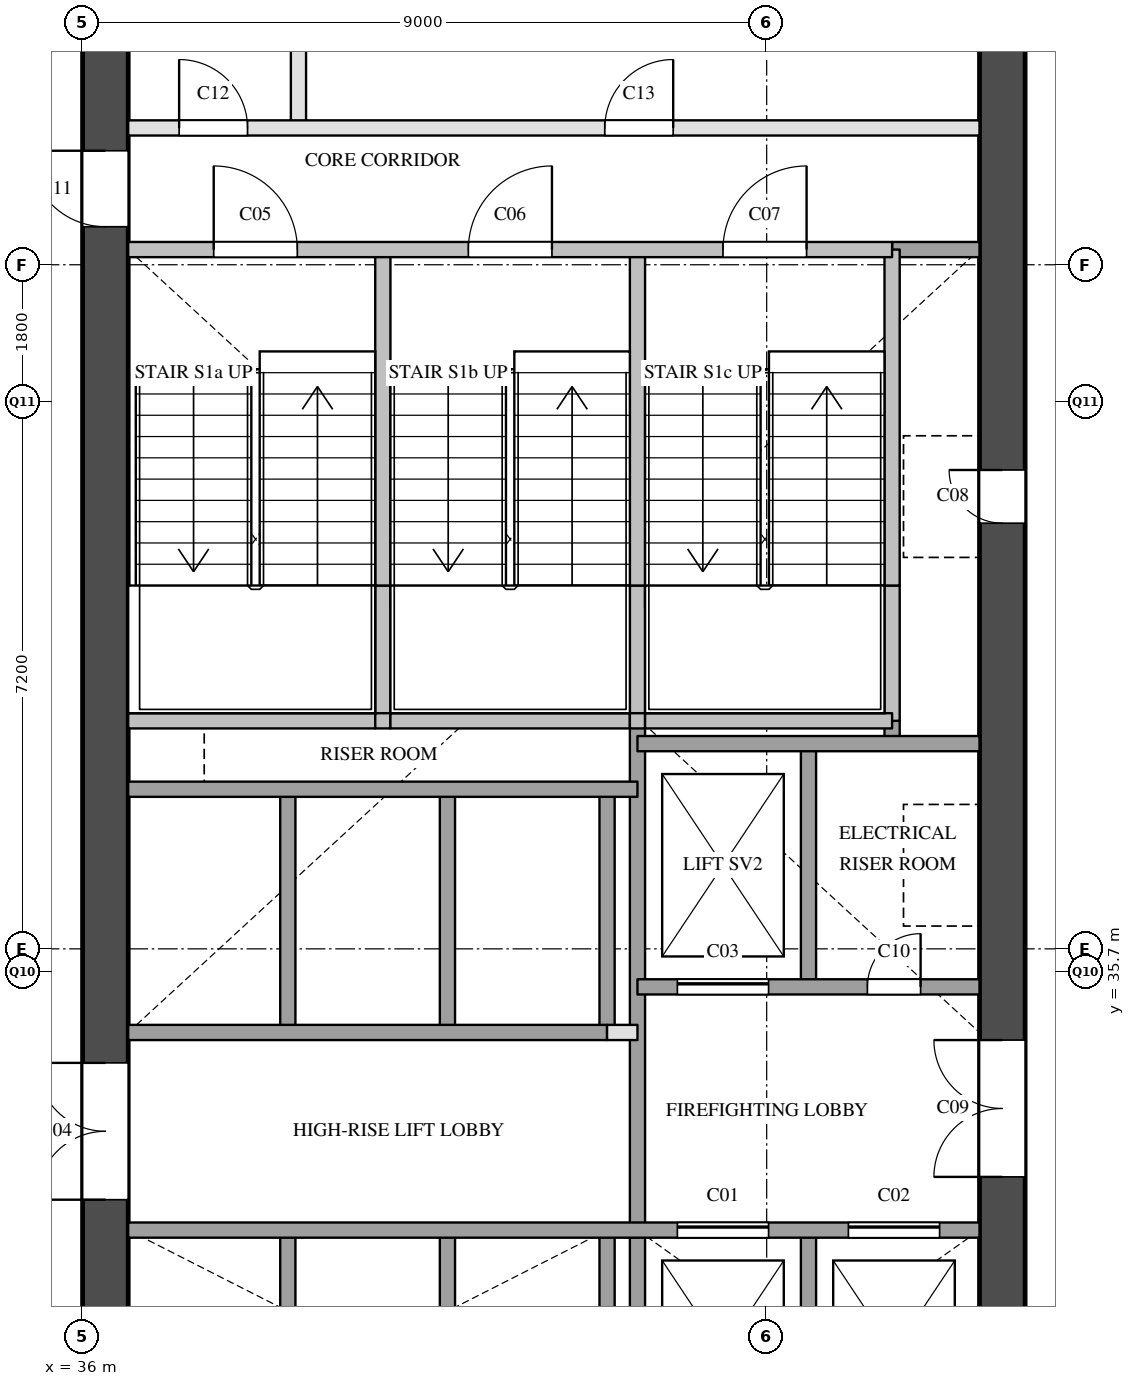
"""IFC4 building model, lengths in metres.
Left out: names, types, materials, properties, quantities, classifications, styles, units other than length and angle.
Written with IfcOpenShell. Run it as: python <this file> out.ifc"""

import sys

from ifc_helpers import new_model, si_unit, direction, frame, frame_2d, origin, place, context, subcontext, project, spatial, rectangle, extrude, element, fill, save


model = new_model("IFC4")
c1 = context("Model", 3, precision=1e-05, world=origin(), true_north=direction((0.0, 1.0)))
c2 = subcontext(c1, "Body", "Model", "MODEL_VIEW")
j1 = project(units=[si_unit("LENGTHUNIT", "METRE"), si_unit("PLANEANGLEUNIT", "RADIAN")], contexts=[c1])
p1 = place(None, origin())
s1 = spatial("IfcSite", under=j1, at=p1, CompositionType="ELEMENT")
p2 = place(p1, origin())
s2 = spatial("IfcBuilding", under=s1, at=p2, CompositionType="ELEMENT")
p3 = place(p2, frame((0.0, 0.0, 53.8)))
s3 = spatial("IfcBuildingStorey", under=s2, at=p3, CompositionType="ELEMENT", Elevation=53.8)
p4 = place(p3, frame((36.3, 29.1, 0.0), z_axis=(0.0, 0.0, 1.0), x_axis=(0.0, 1.0, 0.0)))
e1 = element("IfcWall", 1, at=p4, inside=s3, PredefinedType="SHEAR", context=c2, shape_type="SweptSolid", body=[
    extrude(rectangle(XDim=20.3, YDim=0.6, at=frame_2d((10.15, 0.0))), origin(), (0.0, 0.0, 1.0), 3.5),
])
p5 = place(p4, frame((3.6, 0.0, 0.0)))
e2 = element("IfcOpeningElement", 2, at=p5, cuts=e1, PredefinedType="OPENING", context=c2, shape_type="SweptSolid", body=[
    extrude(rectangle(XDim=1.8, YDim=2.1, at=frame_2d((0.9, 1.05))), frame((0.0, 0.31, 0.0), z_axis=(0.0, -1.0, 0.0), x_axis=(1.0, 0.0, 0.0)), (0.0, 0.0, 1.0), 0.62),
])
p6 = place(p4, frame((16.4, 0.0, 0.0)))
e3 = element("IfcOpeningElement", 3, at=p6, cuts=e1, PredefinedType="OPENING", context=c2, shape_type="SweptSolid", body=[
    extrude(rectangle(XDim=1.0, YDim=2.1, at=frame_2d((0.5, 1.05))), frame((0.0, 0.31, 0.0), z_axis=(0.0, -1.0, 0.0), x_axis=(1.0, 0.0, 0.0)), (0.0, 0.0, 1.0), 0.62),
])
p7 = place(p3, frame((48.1, 29.1, 0.0), z_axis=(0.0, 0.0, 1.0), x_axis=(0.0, 1.0, 0.0)))
e4 = element("IfcWall", 4, at=p7, inside=s3, PredefinedType="SHEAR", context=c2, shape_type="SweptSolid", body=[
    extrude(rectangle(XDim=20.3, YDim=0.6, at=frame_2d((10.15, 0.0))), origin(), (0.0, 0.0, 1.0), 3.5),
])
p8 = place(p7, frame((12.5, 0.0, 0.0)))
e5 = element("IfcOpeningElement", 5, at=p8, cuts=e4, PredefinedType="OPENING", context=c2, shape_type="SweptSolid", body=[
    extrude(rectangle(XDim=0.7, YDim=2.1, at=frame_2d((0.35, 1.05))), frame((0.0, 0.31, 0.0), z_axis=(0.0, -1.0, 0.0), x_axis=(1.0, 0.0, 0.0)), (0.0, 0.0, 1.0), 0.62),
])
p9 = place(p7, frame((3.9, 0.0, 0.0)))
e6 = element("IfcOpeningElement", 6, at=p9, cuts=e4, PredefinedType="OPENING", context=c2, shape_type="SweptSolid", body=[
    extrude(rectangle(XDim=1.8, YDim=2.1, at=frame_2d((0.9, 1.05))), frame((0.0, 0.31, 0.0), z_axis=(0.0, -1.0, 0.0), x_axis=(1.0, 0.0, 0.0)), (0.0, 0.0, 1.0), 0.62),
])
p10 = place(p3, frame((38.7, 29.1, 0.0), z_axis=(0.0, 0.0, 1.0), x_axis=(0.0, 1.0, 0.0)))
e7 = element("IfcWall", 7, at=p10, inside=s3, PredefinedType="SOLIDWALL", context=c2, shape_type="SweptSolid", body=[
    extrude(rectangle(XDim=3.2, YDim=0.2, at=frame_2d((1.6, 0.0))), origin(), (0.0, 0.0, 1.0), 3.5),
])
p11 = place(p3, frame((38.7, 34.9, 0.0), z_axis=(0.0, 0.0, 1.0), x_axis=(0.0, 1.0, 0.0)))
e8 = element("IfcWall", 8, at=p11, inside=s3, PredefinedType="SOLIDWALL", context=c2, shape_type="SweptSolid", body=[
    extrude(rectangle(XDim=3.2, YDim=0.2, at=frame_2d((1.6, 0.0))), origin(), (0.0, 0.0, 1.0), 3.5),
])
p12 = place(p3, frame((38.84, 46.8, 0.0), z_axis=(0.0, 0.0, 1.0), x_axis=(0.0, 1.0, 0.0)))
e9 = element("IfcWall", 9, at=p12, inside=s3, PredefinedType="PARTITIONING", context=c2, shape_type="SweptSolid", body=[
    extrude(rectangle(XDim=2.2, YDim=0.2, at=frame_2d((1.1, 0.0))), origin(), (0.0, 0.0, 1.0), 3.5),
])
p13 = place(p3, frame((39.95, 39.0, 0.0), z_axis=(0.0, 0.0, 1.0), x_axis=(0.0, 1.0, 0.0)))
e10 = element("IfcWall", 10, at=p13, inside=s3, PredefinedType="SOLIDWALL", context=c2, shape_type="SweptSolid", body=[
    extrude(rectangle(XDim=1.78, YDim=0.2, at=frame_2d((0.89, 0.0))), origin(), (0.0, 0.0, 1.0), 3.5),
])
p14 = place(p3, frame((39.95, 40.78, 0.0), z_axis=(0.0, 0.0, 1.0), x_axis=(0.0, 1.0, 0.0)))
e11 = element("IfcWall", 11, at=p14, inside=s3, PredefinedType="SOLIDWALL", context=c2, shape_type="SweptSolid", body=[
    extrude(rectangle(XDim=4.42, YDim=0.2, at=frame_2d((2.21, 0.0))), origin(), (0.0, 0.0, 1.0), 3.5),
])
p15 = place(p3, frame((40.8, 29.1, 0.0), z_axis=(0.0, 0.0, 1.0), x_axis=(0.0, 1.0, 0.0)))
e12 = element("IfcWall", 12, at=p15, inside=s3, PredefinedType="SOLIDWALL", context=c2, shape_type="SweptSolid", body=[
    extrude(rectangle(XDim=3.2, YDim=0.2, at=frame_2d((1.6, 0.0))), origin(), (0.0, 0.0, 1.0), 3.5),
])
p16 = place(p3, frame((40.8, 34.9, 0.0), z_axis=(0.0, 0.0, 1.0), x_axis=(0.0, 1.0, 0.0)))
e13 = element("IfcWall", 13, at=p16, inside=s3, PredefinedType="SOLIDWALL", context=c2, shape_type="SweptSolid", body=[
    extrude(rectangle(XDim=3.2, YDim=0.2, at=frame_2d((1.6, 0.0))), origin(), (0.0, 0.0, 1.0), 3.5),
])
p17 = place(p3, frame((42.9, 29.1, 0.0), z_axis=(0.0, 0.0, 1.0), x_axis=(0.0, 1.0, 0.0)))
e14 = element("IfcWall", 14, at=p17, inside=s3, PredefinedType="SOLIDWALL", context=c2, shape_type="SweptSolid", body=[
    extrude(rectangle(XDim=3.2, YDim=0.2, at=frame_2d((1.6, 0.0))), origin(), (0.0, 0.0, 1.0), 3.5),
])
p18 = place(p3, frame((42.9, 34.9, 0.0), z_axis=(0.0, 0.0, 1.0), x_axis=(0.0, 1.0, 0.0)))
e15 = element("IfcWall", 15, at=p18, inside=s3, PredefinedType="SOLIDWALL", context=c2, shape_type="SweptSolid", body=[
    extrude(rectangle(XDim=3.2, YDim=0.2, at=frame_2d((1.6, 0.0))), origin(), (0.0, 0.0, 1.0), 3.5),
])
p19 = place(p3, frame((43.3, 29.1, 0.0), z_axis=(0.0, 0.0, 1.0), x_axis=(0.0, 1.0, 0.0)))
e16 = element("IfcWall", 16, at=p19, inside=s3, PredefinedType="SOLIDWALL", context=c2, shape_type="SweptSolid", body=[
    extrude(rectangle(XDim=9.9, YDim=0.2, at=frame_2d((4.95, 0.0))), origin(), (0.0, 0.0, 1.0), 3.5),
])
p20 = place(p3, frame((43.3, 39.0, 0.0), z_axis=(0.0, 0.0, 1.0), x_axis=(0.0, 1.0, 0.0)))
e17 = element("IfcWall", 17, at=p20, inside=s3, PredefinedType="SOLIDWALL", context=c2, shape_type="SweptSolid", body=[
    extrude(rectangle(XDim=1.78, YDim=0.2, at=frame_2d((0.89, 0.0))), origin(), (0.0, 0.0, 1.0), 3.5),
])
p21 = place(p3, frame((43.3, 40.78, 0.0), z_axis=(0.0, 0.0, 1.0), x_axis=(0.0, 1.0, 0.0)))
e18 = element("IfcWall", 18, at=p21, inside=s3, PredefinedType="SOLIDWALL", context=c2, shape_type="SweptSolid", body=[
    extrude(rectangle(XDim=4.42, YDim=0.2, at=frame_2d((2.21, 0.0))), origin(), (0.0, 0.0, 1.0), 3.5),
])
for number, where, z_axis, x_axis in (
    (19, (45.55, 29.1, 0.0), (0.0, 0.0, 1.0), (0.0, 1.0, 0.0)),
    (20, (45.55, 35.5, 0.0), (0.0, 0.0, 1.0), (0.0, 1.0, 0.0)),
):
    element("IfcWall", number, at=place(p3, frame(where, z_axis=z_axis, x_axis=x_axis)), inside=s3, PredefinedType="SOLIDWALL", context=c2, shape_type="SweptSolid", body=[
        extrude(rectangle(XDim=3.2, YDim=0.2, at=frame_2d((1.6, 0.0))), origin(), (0.0, 0.0, 1.0), 3.5),
    ])
p22 = place(p3, frame((46.65, 38.7, 0.0), z_axis=(0.0, 0.0, 1.0), x_axis=(0.0, 1.0, 0.0)))
e21 = element("IfcWall", 21, at=p22, inside=s3, PredefinedType="SOLIDWALL", context=c2, shape_type="SweptSolid", body=[
    extrude(rectangle(XDim=0.3, YDim=0.2, at=frame_2d((0.15, 0.0))), origin(), (0.0, 0.0, 1.0), 3.5),
])
p23 = place(p3, frame((46.65, 39.0, 0.0), z_axis=(0.0, 0.0, 1.0), x_axis=(0.0, 1.0, 0.0)))
e22 = element("IfcWall", 22, at=p23, inside=s3, PredefinedType="SOLIDWALL", context=c2, shape_type="SweptSolid", body=[
    extrude(rectangle(XDim=1.78, YDim=0.2, at=frame_2d((0.89, 0.0))), origin(), (0.0, 0.0, 1.0), 3.5),
])
p24 = place(p3, frame((46.65, 40.78, 0.0), z_axis=(0.0, 0.0, 1.0), x_axis=(0.0, 1.0, 0.0)))
e23 = element("IfcWall", 23, at=p24, inside=s3, PredefinedType="SOLIDWALL", context=c2, shape_type="SweptSolid", body=[
    extrude(rectangle(XDim=4.42, YDim=0.2, at=frame_2d((2.21, 0.0))), origin(), (0.0, 0.0, 1.0), 3.5),
])
p25 = place(p3, frame((36.6, 32.3, 0.0), z_axis=(0.0, 0.0, 1.0), x_axis=(1.0, 0.0, 0.0)))
e24 = element("IfcWall", 24, at=p25, inside=s3, PredefinedType="SOLIDWALL", context=c2, shape_type="SweptSolid", body=[
    extrude(rectangle(XDim=11.2, YDim=0.2, at=frame_2d((5.6, 0.0))), origin(), (0.0, 0.0, 1.0), 3.5),
])
p26 = place(p25, frame((7.225, 0.0, 0.0)))
e25 = element("IfcOpeningElement", 25, at=p26, cuts=e24, PredefinedType="OPENING", context=c2, shape_type="SweptSolid", body=[
    extrude(rectangle(XDim=1.2, YDim=2.1, at=frame_2d((0.6, 1.05))), frame((0.0, 0.11, 0.0), z_axis=(0.0, -1.0, 0.0), x_axis=(1.0, 0.0, 0.0)), (0.0, 0.0, 1.0), 0.22),
])
p27 = place(p25, frame((9.475, 0.0, 0.0)))
e26 = element("IfcOpeningElement", 26, at=p27, cuts=e24, PredefinedType="OPENING", context=c2, shape_type="SweptSolid", body=[
    extrude(rectangle(XDim=1.2, YDim=2.1, at=frame_2d((0.6, 1.05))), frame((0.0, 0.11, 0.0), z_axis=(0.0, -1.0, 0.0), x_axis=(1.0, 0.0, 0.0)), (0.0, 0.0, 1.0), 0.22),
])
p28 = place(p3, frame((42.9, 34.9, 0.0), z_axis=(0.0, 0.0, 1.0), x_axis=(1.0, 0.0, 0.0)))
e27 = element("IfcWall", 27, at=p28, inside=s3, PredefinedType="PARTITIONING", context=c2, shape_type="SweptSolid", body=[
    extrude(rectangle(XDim=0.4, YDim=0.2, at=frame_2d((0.2, 0.0))), origin(), (0.0, 0.0, 1.0), 3.5),
])
p29 = place(p3, frame((36.6, 34.9, 0.0), z_axis=(0.0, 0.0, 1.0), x_axis=(1.0, 0.0, 0.0)))
e28 = element("IfcWall", 28, at=p29, inside=s3, PredefinedType="SOLIDWALL", context=c2, shape_type="SweptSolid", body=[
    extrude(rectangle(XDim=6.3, YDim=0.2, at=frame_2d((3.15, 0.0))), origin(), (0.0, 0.0, 1.0), 3.5),
])
p30 = place(p3, frame((43.3, 35.5, 0.0), z_axis=(0.0, 0.0, 1.0), x_axis=(1.0, 0.0, 0.0)))
e29 = element("IfcWall", 29, at=p30, inside=s3, PredefinedType="SOLIDWALL", context=c2, shape_type="SweptSolid", body=[
    extrude(rectangle(XDim=4.5, YDim=0.2, at=frame_2d((2.25, 0.0))), origin(), (0.0, 0.0, 1.0), 3.5),
])
p31 = place(p30, frame((0.525, 0.0, 0.0)))
e30 = element("IfcOpeningElement", 30, at=p31, cuts=e29, PredefinedType="OPENING", context=c2, shape_type="SweptSolid", body=[
    extrude(rectangle(XDim=1.2, YDim=2.1, at=frame_2d((0.6, 1.05))), frame((0.0, 0.11, 0.0), z_axis=(0.0, -1.0, 0.0), x_axis=(1.0, 0.0, 0.0)), (0.0, 0.0, 1.0), 0.22),
])
p32 = place(p30, frame((3.025, 0.0, 0.0)))
e31 = element("IfcOpeningElement", 31, at=p32, cuts=e29, PredefinedType="OPENING", context=c2, shape_type="SweptSolid", body=[
    extrude(rectangle(XDim=0.7, YDim=2.1, at=frame_2d((0.35, 1.05))), frame((0.0, 0.11, 0.0), z_axis=(0.0, -1.0, 0.0), x_axis=(1.0, 0.0, 0.0)), (0.0, 0.0, 1.0), 0.22),
])
p33 = place(p3, frame((36.6, 38.1, 0.0), z_axis=(0.0, 0.0, 1.0), x_axis=(1.0, 0.0, 0.0)))
e32 = element("IfcWall", 32, at=p33, inside=s3, PredefinedType="SOLIDWALL", context=c2, shape_type="SweptSolid", body=[
    extrude(rectangle(XDim=6.7, YDim=0.2, at=frame_2d((3.35, 0.0))), origin(), (0.0, 0.0, 1.0), 3.5),
])
p34 = place(p3, frame((43.3, 38.7, 0.0), z_axis=(0.0, 0.0, 1.0), x_axis=(1.0, 0.0, 0.0)))
e33 = element("IfcWall", 33, at=p34, inside=s3, PredefinedType="SOLIDWALL", context=c2, shape_type="SweptSolid", body=[
    extrude(rectangle(XDim=4.5, YDim=0.2, at=frame_2d((2.25, 0.0))), origin(), (0.0, 0.0, 1.0), 3.5),
])
p35 = place(p3, frame((36.6, 39.0, 0.0), z_axis=(0.0, 0.0, 1.0), x_axis=(1.0, 0.0, 0.0)))
e34 = element("IfcWall", 34, at=p35, inside=s3, PredefinedType="SOLIDWALL", context=c2, shape_type="SweptSolid", body=[
    extrude(rectangle(XDim=3.25, YDim=0.2, at=frame_2d((1.625, 0.0))), origin(), (0.0, 0.0, 1.0), 3.5),
])
p36 = place(p3, frame((39.85, 39.0, 0.0), z_axis=(0.0, 0.0, 1.0), x_axis=(1.0, 0.0, 0.0)))
e35 = element("IfcWall", 35, at=p36, inside=s3, PredefinedType="SOLIDWALL", context=c2, shape_type="SweptSolid", body=[
    extrude(rectangle(XDim=0.2, YDim=0.2, at=frame_2d((0.1, 0.0))), origin(), (0.0, 0.0, 1.0), 3.5),
])
p37 = place(p3, frame((40.05, 39.0, 0.0), z_axis=(0.0, 0.0, 1.0), x_axis=(1.0, 0.0, 0.0)))
e36 = element("IfcWall", 36, at=p37, inside=s3, PredefinedType="SOLIDWALL", context=c2, shape_type="SweptSolid", body=[
    extrude(rectangle(XDim=3.15, YDim=0.2, at=frame_2d((1.575, 0.0))), origin(), (0.0, 0.0, 1.0), 3.5),
])
p38 = place(p3, frame((43.2, 39.0, 0.0), z_axis=(0.0, 0.0, 1.0), x_axis=(1.0, 0.0, 0.0)))
e37 = element("IfcWall", 37, at=p38, inside=s3, PredefinedType="SOLIDWALL", context=c2, shape_type="SweptSolid", body=[
    extrude(rectangle(XDim=0.2, YDim=0.2, at=frame_2d((0.1, 0.0))), origin(), (0.0, 0.0, 1.0), 3.5),
])
p39 = place(p3, frame((43.4, 39.0, 0.0), z_axis=(0.0, 0.0, 1.0), x_axis=(1.0, 0.0, 0.0)))
e38 = element("IfcWall", 38, at=p39, inside=s3, PredefinedType="SOLIDWALL", context=c2, shape_type="SweptSolid", body=[
    extrude(rectangle(XDim=3.25, YDim=0.2, at=frame_2d((1.625, 0.0))), origin(), (0.0, 0.0, 1.0), 3.5),
])
p40 = place(p3, frame((46.65, 45.2, 0.0), z_axis=(0.0, 0.0, 1.0), x_axis=(1.0, 0.0, 0.0)))
e39 = element("IfcWall", 39, at=p40, inside=s3, PredefinedType="SOLIDWALL", context=c2, shape_type="SweptSolid", body=[
    extrude(rectangle(XDim=1.15, YDim=0.2, at=frame_2d((0.575, 0.0))), origin(), (0.0, 0.0, 1.0), 3.5),
])
p41 = place(p3, frame((36.6, 45.2, 0.0), z_axis=(0.0, 0.0, 1.0), x_axis=(1.0, 0.0, 0.0)))
e40 = element("IfcWall", 40, at=p41, inside=s3, PredefinedType="SOLIDWALL", context=c2, shape_type="SweptSolid", body=[
    extrude(rectangle(XDim=10.05, YDim=0.2, at=frame_2d((5.025, 0.0))), origin(), (0.0, 0.0, 1.0), 3.5),
])
p42 = place(p41, frame((1.125, 0.0, 0.0)))
e41 = element("IfcOpeningElement", 41, at=p42, cuts=e40, PredefinedType="OPENING", context=c2, shape_type="SweptSolid", body=[
    extrude(rectangle(XDim=1.1, YDim=2.1, at=frame_2d((0.55, 1.05))), frame((0.0, 0.11, 0.0), z_axis=(0.0, -1.0, 0.0), x_axis=(1.0, 0.0, 0.0)), (0.0, 0.0, 1.0), 0.22),
])
p43 = place(p41, frame((4.475, 0.0, 0.0)))
e42 = element("IfcOpeningElement", 42, at=p43, cuts=e40, PredefinedType="OPENING", context=c2, shape_type="SweptSolid", body=[
    extrude(rectangle(XDim=1.1, YDim=2.1, at=frame_2d((0.55, 1.05))), frame((0.0, 0.11, 0.0), z_axis=(0.0, -1.0, 0.0), x_axis=(1.0, 0.0, 0.0)), (0.0, 0.0, 1.0), 0.22),
])
p44 = place(p41, frame((7.825, 0.0, 0.0)))
e43 = element("IfcOpeningElement", 43, at=p44, cuts=e40, PredefinedType="OPENING", context=c2, shape_type="SweptSolid", body=[
    extrude(rectangle(XDim=1.1, YDim=2.1, at=frame_2d((0.55, 1.05))), frame((0.0, 0.11, 0.0), z_axis=(0.0, -1.0, 0.0), x_axis=(1.0, 0.0, 0.0)), (0.0, 0.0, 1.0), 0.22),
])
p45 = place(p3, frame((36.6, 46.8, 0.0), z_axis=(0.0, 0.0, 1.0), x_axis=(1.0, 0.0, 0.0)))
e44 = element("IfcWall", 44, at=p45, inside=s3, PredefinedType="PARTITIONING", context=c2, shape_type="SweptSolid", body=[
    extrude(rectangle(XDim=11.2, YDim=0.2, at=frame_2d((5.6, 0.0))), origin(), (0.0, 0.0, 1.0), 3.5),
])
p46 = place(p45, frame((0.67, 0.0, 0.0)))
e45 = element("IfcOpeningElement", 45, at=p46, cuts=e44, PredefinedType="OPENING", context=c2, shape_type="SweptSolid", body=[
    extrude(rectangle(XDim=0.9, YDim=2.1, at=frame_2d((0.45, 1.05))), frame((0.0, 0.11, 0.0), z_axis=(0.0, -1.0, 0.0), x_axis=(1.0, 0.0, 0.0)), (0.0, 0.0, 1.0), 0.22),
])
p47 = place(p45, frame((6.27, 0.0, 0.0)))
e46 = element("IfcOpeningElement", 46, at=p47, cuts=e44, PredefinedType="OPENING", context=c2, shape_type="SweptSolid", body=[
    extrude(rectangle(XDim=0.9, YDim=2.1, at=frame_2d((0.45, 1.05))), frame((0.0, 0.11, 0.0), z_axis=(0.0, -1.0, 0.0), x_axis=(1.0, 0.0, 0.0)), (0.0, 0.0, 1.0), 0.22),
])
p48 = place(p26, origin())
e47 = element("IfcDoor", 47, at=p48, inside=s3, OperationType="SLIDING_TO_LEFT", PredefinedType="DOOR", context=c2, shape_type="SweptSolid", body=[
    extrude(rectangle(XDim=1.2, YDim=2.1, at=frame_2d((0.6, 1.05))), frame((0.0, 0.025, 0.0), z_axis=(0.0, -1.0, 0.0), x_axis=(1.0, 0.0, 0.0)), (0.0, 0.0, 1.0), 0.05),
])
fill(e25, e47)
p49 = place(p27, origin())
e48 = element("IfcDoor", 48, at=p49, inside=s3, OperationType="SLIDING_TO_LEFT", PredefinedType="DOOR", context=c2, shape_type="SweptSolid", body=[
    extrude(rectangle(XDim=1.2, YDim=2.1, at=frame_2d((0.6, 1.05))), frame((0.0, 0.025, 0.0), z_axis=(0.0, -1.0, 0.0), x_axis=(1.0, 0.0, 0.0)), (0.0, 0.0, 1.0), 0.05),
])
fill(e26, e48)
p50 = place(p31, origin())
e49 = element("IfcDoor", 49, at=p50, inside=s3, OperationType="SLIDING_TO_LEFT", PredefinedType="DOOR", context=c2, shape_type="SweptSolid", body=[
    extrude(rectangle(XDim=1.2, YDim=2.1, at=frame_2d((0.6, 1.05))), frame((0.0, 0.025, 0.0), z_axis=(0.0, -1.0, 0.0), x_axis=(1.0, 0.0, 0.0)), (0.0, 0.0, 1.0), 0.05),
])
fill(e30, e49)
p51 = place(p5, origin())
e50 = element("IfcDoor", 50, at=p51, inside=s3, OperationType="DOUBLE_DOOR_SINGLE_SWING", PredefinedType="DOOR", context=c2, shape_type="SweptSolid", body=[
    extrude(rectangle(XDim=1.8, YDim=2.1, at=frame_2d((0.9, 1.05))), frame((0.0, 0.025, 0.0), z_axis=(0.0, -1.0, 0.0), x_axis=(1.0, 0.0, 0.0)), (0.0, 0.0, 1.0), 0.05),
])
fill(e2, e50)
p52 = place(p42, origin())
e51 = element("IfcDoor", 51, at=p52, inside=s3, OperationType="SINGLE_SWING_LEFT", PredefinedType="DOOR", context=c2, shape_type="SweptSolid", body=[
    extrude(rectangle(XDim=1.1, YDim=2.1, at=frame_2d((0.55, 1.05))), frame((0.0, 0.025, 0.0), z_axis=(0.0, -1.0, 0.0), x_axis=(1.0, 0.0, 0.0)), (0.0, 0.0, 1.0), 0.05),
])
fill(e41, e51)
p53 = place(p43, origin())
e52 = element("IfcDoor", 52, at=p53, inside=s3, OperationType="SINGLE_SWING_RIGHT", PredefinedType="DOOR", context=c2, shape_type="SweptSolid", body=[
    extrude(rectangle(XDim=1.1, YDim=2.1, at=frame_2d((0.55, 1.05))), frame((0.0, 0.025, 0.0), z_axis=(0.0, -1.0, 0.0), x_axis=(1.0, 0.0, 0.0)), (0.0, 0.0, 1.0), 0.05),
])
fill(e42, e52)
p54 = place(p44, origin())
e53 = element("IfcDoor", 53, at=p54, inside=s3, OperationType="SINGLE_SWING_RIGHT", PredefinedType="DOOR", context=c2, shape_type="SweptSolid", body=[
    extrude(rectangle(XDim=1.1, YDim=2.1, at=frame_2d((0.55, 1.05))), frame((0.0, 0.025, 0.0), z_axis=(0.0, -1.0, 0.0), x_axis=(1.0, 0.0, 0.0)), (0.0, 0.0, 1.0), 0.05),
])
fill(e43, e53)
p55 = place(p8, origin())
e54 = element("IfcDoor", 54, at=p55, inside=s3, OperationType="SINGLE_SWING_RIGHT", PredefinedType="DOOR", context=c2, shape_type="SweptSolid", body=[
    extrude(rectangle(XDim=0.7, YDim=2.1, at=frame_2d((0.35, 1.05))), frame((0.0, 0.025, 0.0), z_axis=(0.0, -1.0, 0.0), x_axis=(1.0, 0.0, 0.0)), (0.0, 0.0, 1.0), 0.05),
])
fill(e5, e54)
p56 = place(p9, origin())
e55 = element("IfcDoor", 55, at=p56, inside=s3, OperationType="DOUBLE_DOOR_SINGLE_SWING", PredefinedType="DOOR", context=c2, shape_type="SweptSolid", body=[
    extrude(rectangle(XDim=1.8, YDim=2.1, at=frame_2d((0.9, 1.05))), frame((0.0, 0.025, 0.0), z_axis=(0.0, -1.0, 0.0), x_axis=(1.0, 0.0, 0.0)), (0.0, 0.0, 1.0), 0.05),
])
fill(e6, e55)
p57 = place(p32, origin())
e56 = element("IfcDoor", 56, at=p57, inside=s3, OperationType="SINGLE_SWING_RIGHT", PredefinedType="DOOR", context=c2, shape_type="SweptSolid", body=[
    extrude(rectangle(XDim=0.7, YDim=2.1, at=frame_2d((0.35, 1.05))), frame((0.0, 0.025, 0.0), z_axis=(0.0, -1.0, 0.0), x_axis=(1.0, 0.0, 0.0)), (0.0, 0.0, 1.0), 0.05),
])
fill(e31, e56)
p58 = place(p6, origin())
e57 = element("IfcDoor", 57, at=p58, inside=s3, OperationType="SINGLE_SWING_RIGHT", PredefinedType="DOOR", context=c2, shape_type="SweptSolid", body=[
    extrude(rectangle(XDim=1.0, YDim=2.1, at=frame_2d((0.5, 1.05))), frame((0.0, 0.025, 0.0), z_axis=(0.0, -1.0, 0.0), x_axis=(1.0, 0.0, 0.0)), (0.0, 0.0, 1.0), 0.05),
])
fill(e3, e57)
p59 = place(p46, origin())
e58 = element("IfcDoor", 58, at=p59, inside=s3, OperationType="SINGLE_SWING_LEFT", PredefinedType="DOOR", context=c2, shape_type="SweptSolid", body=[
    extrude(rectangle(XDim=0.9, YDim=2.1, at=frame_2d((0.45, 1.05))), frame((0.0, 0.025, 0.0), z_axis=(0.0, -1.0, 0.0), x_axis=(1.0, 0.0, 0.0)), (0.0, 0.0, 1.0), 0.05),
])
fill(e45, e58)
p60 = place(p47, origin())
e59 = element("IfcDoor", 59, at=p60, inside=s3, OperationType="SINGLE_SWING_RIGHT", PredefinedType="DOOR", context=c2, shape_type="SweptSolid", body=[
    extrude(rectangle(XDim=0.9, YDim=2.1, at=frame_2d((0.45, 1.05))), frame((0.0, 0.025, 0.0), z_axis=(0.0, -1.0, 0.0), x_axis=(1.0, 0.0, 0.0)), (0.0, 0.0, 1.0), 0.05),
])
fill(e46, e59)
save(model, sys.argv[1])
